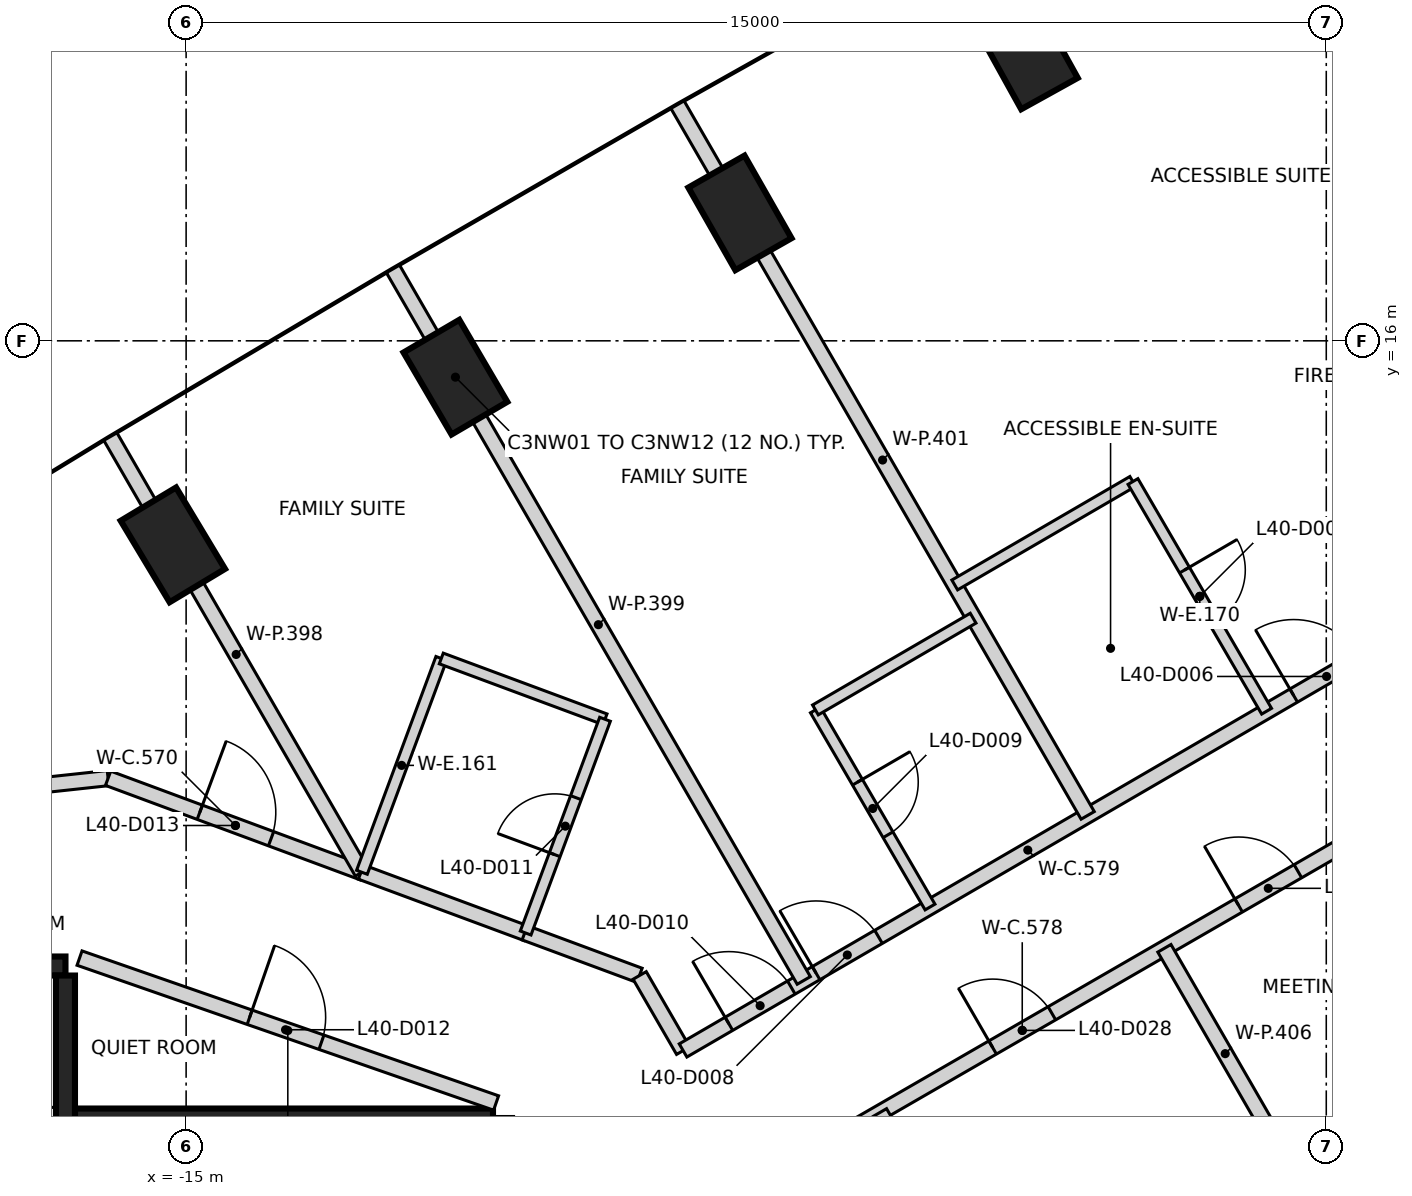
"""IFC4 building model, lengths in metres.
Left out: names, types, materials, properties, quantities, classifications, styles, units other than length and angle.
Written with IfcOpenShell. Run it as: python <this file> out.ifc"""

import sys

from ifc_helpers import new_model, si_unit, direction, frame, frame_2d, origin, origin_2d, place, context, subcontext, project, spatial, rectangle, extrude, element, fill, save


model = new_model("IFC4")
c1 = context("Model", 3, precision=1e-05, world=origin(), true_north=direction((0.0, 1.0)))
c2 = subcontext(c1, "Body", "Model", "MODEL_VIEW")
j1 = project(units=[si_unit("LENGTHUNIT", "METRE"), si_unit("PLANEANGLEUNIT", "RADIAN")], contexts=[c1])
p1 = place(None, origin())
s1 = spatial("IfcSite", under=j1, at=p1, CompositionType="ELEMENT")
p2 = place(p1, origin())
s2 = spatial("IfcBuilding", under=s1, at=p2, CompositionType="ELEMENT")
p3 = place(p2, frame((0.0, 0.0, 161.2)))
s3 = spatial("IfcBuildingStorey", under=s2, at=p3, CompositionType="ELEMENT", Elevation=161.2)
for number, where, z_axis, x_axis in (
    (1, (-3.945, 19.8, -0.4), (0.0, 0.0, 1.0), (-0.485, 0.875, 0.0)),
    (2, (-7.714, 17.683, -0.4), (0.0, 0.0, 1.0), (-0.495, 0.869, 0.0)),
    (3, (-11.457, 15.522, -0.4), (0.0, 0.0, 1.0), (-0.505, 0.863, 0.0)),
    (4, (-15.175, 13.316, -0.4), (0.0, 0.0, 1.0), (-0.515, 0.857, 0.0)),
):
    element("IfcColumn", number, at=place(p3, frame(where, z_axis=z_axis, x_axis=x_axis)), inside=s3, PredefinedType="COLUMN", context=c2, shape_type="SweptSolid", body=[
        extrude(rectangle(XDim=1.25, YDim=0.85, at=origin_2d()), origin(), (0.0, 0.0, 1.0), 2.884),
    ])
p4 = place(p3, frame((-16.472, 5.775, 0.0), z_axis=(0.0, 0.0, 1.0), x_axis=(1.0, 0.0, 0.0)))
e5 = element("IfcWall", 5, at=p4, inside=s3, PredefinedType="SHEAR", context=c2, shape_type="SweptSolid", body=[
    extrude(rectangle(XDim=5.51, YDim=0.25, at=frame_2d((2.755, 0.0))), origin(), (0.0, 0.0, 1.0), 3.2),
])
p5 = place(p3, frame((-19.637, 7.775, 0.0), z_axis=(0.0, 0.0, 1.0), x_axis=(1.0, 0.0, 0.0)))
e6 = element("IfcWall", 6, at=p5, inside=s3, PredefinedType="SHEAR", context=c2, shape_type="SweptSolid", body=[
    extrude(rectangle(XDim=3.05, YDim=0.25, at=frame_2d((1.525, 0.0))), origin(), (0.0, 0.0, 1.0), 3.2),
])
p6 = place(p3, frame((-16.587, 7.65, 0.0), z_axis=(0.0, 0.0, 1.0), x_axis=(0.0, -1.0, 0.0)))
e7 = element("IfcWall", 7, at=p6, inside=s3, PredefinedType="SHEAR", context=c2, shape_type="SweptSolid", body=[
    extrude(rectangle(XDim=2.865, YDim=0.25, at=frame_2d((1.432, 0.0))), origin(), (0.0, 0.0, 1.0), 3.2),
])
p7 = place(p3, frame((-18.865, 9.941, 0.0), z_axis=(0.0, 0.0, 1.0), x_axis=(0.99423123086, 0.107257911519, 0.0)))
e8 = element("IfcWall", 8, at=p7, inside=s3, PredefinedType="PARTITIONING", context=c2, shape_type="SweptSolid", body=[
    extrude(rectangle(XDim=2.854, YDim=0.2, at=frame_2d((1.427, 0.0))), origin(), (0.0, 0.0, 1.0), 3.2),
])
p8 = place(p3, frame((-16.402, 7.879, 0.0), z_axis=(0.0, 0.0, 1.0), x_axis=(0.944492255471, -0.328533680702, 0.0)))
e9 = element("IfcWall", 9, at=p8, inside=s3, PredefinedType="PARTITIONING", context=c2, shape_type="SweptSolid", body=[
    extrude(rectangle(XDim=5.802, YDim=0.2, at=frame_2d((2.901, 0.0))), origin(), (0.0, 0.0, 1.0), 3.2),
])
p9 = place(p8, frame((2.37, 0.0, 0.0)))
e10 = element("IfcOpeningElement", 10, at=p9, cuts=e9, PredefinedType="OPENING", context=c2, shape_type="SweptSolid", body=[
    extrude(rectangle(XDim=1.0, YDim=2.1, at=frame_2d((0.5, 1.05))), frame((0.0, 0.11, 0.0), z_axis=(0.0, -1.0, 0.0), x_axis=(1.0, 0.0, 0.0)), (0.0, 0.0, 1.0), 0.22),
])
p10 = place(p3, frame((-16.026, 10.245, 0.0), z_axis=(0.0, 0.0, 1.0), x_axis=(0.937597839511, -0.347721571584, 0.0)))
e11 = element("IfcWall", 11, at=p10, inside=s3, PredefinedType="PARTITIONING", context=c2, shape_type="SweptSolid", body=[
    extrude(rectangle(XDim=3.573, YDim=0.2, at=frame_2d((1.787, 0.0))), origin(), (0.0, 0.0, 1.0), 3.2),
])
p11 = place(p10, frame((1.287, 0.0, 0.0)))
e12 = element("IfcOpeningElement", 12, at=p11, cuts=e11, PredefinedType="OPENING", context=c2, shape_type="SweptSolid", body=[
    extrude(rectangle(XDim=1.0, YDim=2.1, at=frame_2d((0.5, 1.05))), frame((0.0, 0.11, 0.0), z_axis=(0.0, -1.0, 0.0), x_axis=(1.0, 0.0, 0.0)), (0.0, 0.0, 1.0), 0.22),
])
p12 = place(p3, frame((-12.699, 9.011, 0.0), z_axis=(0.0, 0.0, 1.0), x_axis=(0.937666284737, -0.347536959858, 0.0)))
e13 = element("IfcWall", 13, at=p12, inside=s3, PredefinedType="PARTITIONING", context=c2, shape_type="SweptSolid", body=[
    extrude(rectangle(XDim=2.322, YDim=0.2, at=frame_2d((1.161, 0.0))), origin(), (0.0, 0.0, 1.0), 3.2),
])
p13 = place(p3, frame((-10.545, 8.212, 0.0), z_axis=(0.0, 0.0, 1.0), x_axis=(0.937637162141, -0.347615523491, 0.0)))
e14 = element("IfcWall", 14, at=p13, inside=s3, PredefinedType="PARTITIONING", context=c2, shape_type="SweptSolid", body=[
    extrude(rectangle(XDim=1.61, YDim=0.2, at=frame_2d((0.805, 0.0))), origin(), (0.0, 0.0, 1.0), 3.2),
])
p14 = place(p3, frame((-9.033, 7.651, 0.0), z_axis=(0.0, 0.0, 1.0), x_axis=(0.500758224517, -0.86558719987, 0.0)))
e15 = element("IfcWall", 15, at=p14, inside=s3, PredefinedType="PARTITIONING", context=c2, shape_type="SweptSolid", body=[
    extrude(rectangle(XDim=1.142, YDim=0.2, at=frame_2d((0.571, 0.0))), origin(), (0.0, 0.0, 1.0), 3.2),
])
p15 = place(p3, frame((-8.612, 4.265, 0.0), z_axis=(0.0, 0.0, 1.0), x_axis=(0.865984415152, 0.500070987675, 0.0)))
e16 = element("IfcWall", 16, at=p15, inside=s3, PredefinedType="PARTITIONING", context=c2, shape_type="SweptSolid", body=[
    extrude(rectangle(XDim=10.651, YDim=0.2, at=frame_2d((5.326, 0.0))), origin(), (0.0, 0.0, 1.0), 3.2),
])
p16 = place(p15, frame((8.613, 0.0, 0.0)))
e17 = element("IfcOpeningElement", 17, at=p16, cuts=e16, PredefinedType="OPENING", context=c2, shape_type="SweptSolid", body=[
    extrude(rectangle(XDim=0.9, YDim=2.1, at=frame_2d((0.45, 1.05))), frame((0.0, 0.11, 0.0), z_axis=(0.0, -1.0, 0.0), x_axis=(1.0, 0.0, 0.0)), (0.0, 0.0, 1.0), 0.22),
])
p17 = place(p15, frame((4.876, 0.0, 0.0)))
e18 = element("IfcOpeningElement", 18, at=p17, cuts=e16, PredefinedType="OPENING", context=c2, shape_type="SweptSolid", body=[
    extrude(rectangle(XDim=0.9, YDim=2.1, at=frame_2d((0.45, 1.05))), frame((0.0, 0.11, 0.0), z_axis=(0.0, -1.0, 0.0), x_axis=(1.0, 0.0, 0.0)), (0.0, 0.0, 1.0), 0.22),
])
p18 = place(p15, frame((1.138, 0.0, 0.0)))
e19 = element("IfcOpeningElement", 19, at=p18, cuts=e16, PredefinedType="OPENING", context=c2, shape_type="SweptSolid", body=[
    extrude(rectangle(XDim=0.9, YDim=2.1, at=frame_2d((0.45, 1.05))), frame((0.0, 0.11, 0.0), z_axis=(0.0, -1.0, 0.0), x_axis=(1.0, 0.0, 0.0)), (0.0, 0.0, 1.0), 0.22),
])
p19 = place(p3, frame((-8.462, 6.664, 0.0), z_axis=(0.0, 0.0, 1.0), x_axis=(0.864575369233, 0.502503165081, 0.0)))
e20 = element("IfcWall", 20, at=p19, inside=s3, PredefinedType="PARTITIONING", context=c2, shape_type="SweptSolid", body=[
    extrude(rectangle(XDim=10.492, YDim=0.2, at=frame_2d((5.246, 0.0))), origin(), (0.0, 0.0, 1.0), 3.2),
])
p20 = place(p19, frame((9.292, 0.0, 0.0)))
e21 = element("IfcOpeningElement", 21, at=p20, cuts=e20, PredefinedType="OPENING", context=c2, shape_type="SweptSolid", body=[
    extrude(rectangle(XDim=1.0, YDim=2.1, at=frame_2d((0.5, 1.05))), frame((0.0, 0.11, 0.0), z_axis=(0.0, -1.0, 0.0), x_axis=(1.0, 0.0, 0.0)), (0.0, 0.0, 1.0), 0.22),
])
p21 = place(p19, frame((2.024, 0.0, 0.0)))
e22 = element("IfcOpeningElement", 22, at=p21, cuts=e20, PredefinedType="OPENING", context=c2, shape_type="SweptSolid", body=[
    extrude(rectangle(XDim=0.95, YDim=2.1, at=frame_2d((0.475, 1.05))), frame((0.0, 0.11, 0.0), z_axis=(0.0, -1.0, 0.0), x_axis=(1.0, 0.0, 0.0)), (0.0, 0.0, 1.0), 0.22),
])
p22 = place(p19, frame((0.698, 0.0, 0.0)))
e23 = element("IfcOpeningElement", 23, at=p22, cuts=e20, PredefinedType="OPENING", context=c2, shape_type="SweptSolid", body=[
    extrude(rectangle(XDim=0.95, YDim=2.1, at=frame_2d((0.475, 1.05))), frame((0.0, 0.11, 0.0), z_axis=(0.0, -1.0, 0.0), x_axis=(1.0, 0.0, 0.0)), (0.0, 0.0, 1.0), 0.22),
])
p23 = place(p3, frame((-15.996, 14.74, 0.0), z_axis=(0.0, 0.0, 1.0), x_axis=(0.500015153377, -0.866016654801, 0.0)))
e24 = element("IfcWall", 24, at=p23, inside=s3, PredefinedType="PARTITIONING", context=c2, shape_type="SweptSolid", body=[
    extrude(rectangle(XDim=6.618, YDim=0.2, at=frame_2d((3.309, 0.0))), origin(), (0.0, 0.0, 1.0), 3.2),
])
p24 = place(p3, frame((-12.279, 16.946, 0.0), z_axis=(0.0, 0.0, 1.0), x_axis=(0.500003997498, -0.866023095816, 0.0)))
e25 = element("IfcWall", 25, at=p24, inside=s3, PredefinedType="PARTITIONING", context=c2, shape_type="SweptSolid", body=[
    extrude(rectangle(XDim=10.809, YDim=0.2, at=frame_2d((5.405, 0.0))), origin(), (0.0, 0.0, 1.0), 3.2),
])
p25 = place(p3, frame((-8.535, 19.107, 0.0), z_axis=(0.0, 0.0, 1.0), x_axis=(0.499882324153, -0.866093333307, 0.0)))
e26 = element("IfcWall", 26, at=p25, inside=s3, PredefinedType="PARTITIONING", context=c2, shape_type="SweptSolid", body=[
    extrude(rectangle(XDim=10.796, YDim=0.2, at=frame_2d((5.398, 0.0))), origin(), (0.0, 0.0, 1.0), 3.2),
])
p26 = place(p3, frame((-8.0, 0.924, 0.0), z_axis=(0.0, 0.0, 1.0), x_axis=(0.86604129137, 0.499972480886, 0.0)))
e27 = element("IfcWall", 27, at=p26, inside=s3, PredefinedType="PARTITIONING", context=c2, shape_type="SweptSolid", body=[
    extrude(rectangle(XDim=12.932, YDim=0.2, at=frame_2d((6.466, 0.0))), origin(), (0.0, 0.0, 1.0), 2.3),
])
for number, where, z_axis, x_axis in (
    (28, (-5.871, 5.848, 0.0), (0.0, 0.0, 1.0), (0.5, -0.866, 0.0)),
    (29, (-2.13, 8.008, 0.0), (0.0, 0.0, 1.0), (0.5, -0.866, 0.0)),
):
    element("IfcWall", number, at=place(p3, frame(where, z_axis=z_axis, x_axis=x_axis)), inside=s3, PredefinedType="PARTITIONING", context=c2, shape_type="SweptSolid", body=[
        extrude(rectangle(XDim=3.2, YDim=0.2, at=frame_2d((1.6, 0.0))), origin(), (0.0, 0.0, 1.0), 2.3),
    ])
p27 = place(p3, frame((-12.687, 9.008, 0.0), z_axis=(0.0, 0.0, 1.0), x_axis=(0.347929104424, 0.937520846859, 0.0)))
e30 = element("IfcWall", 30, at=p27, inside=s3, PredefinedType="PARTITIONING", context=c2, shape_type="SweptSolid", body=[
    extrude(rectangle(XDim=3.0, YDim=0.15, at=frame_2d((1.5, 0.0))), origin(), (0.0, 0.0, 1.0), 3.2),
])
p28 = place(p3, frame((-11.643, 11.821, 0.0), z_axis=(0.0, 0.0, 1.0), x_axis=(0.937429235302, -0.348175859015, 0.0)))
e31 = element("IfcWall", 31, at=p28, inside=s3, PredefinedType="PARTITIONING", context=c2, shape_type="SweptSolid", body=[
    extrude(rectangle(XDim=2.298, YDim=0.15, at=frame_2d((1.149, 0.0))), origin(), (0.0, 0.0, 1.0), 3.2),
])
p29 = place(p3, frame((-10.533, 8.209, 0.0), z_axis=(0.0, 0.0, 1.0), x_axis=(0.348035300423, 0.937481428968, 0.0)))
e32 = element("IfcWall", 32, at=p29, inside=s3, PredefinedType="PARTITIONING", context=c2, shape_type="SweptSolid", body=[
    extrude(rectangle(XDim=3.0, YDim=0.15, at=frame_2d((1.5, 0.0))), origin(), (0.0, 0.0, 1.0), 3.2),
])
p30 = place(p29, frame((1.1, 0.0, 0.0)))
e33 = element("IfcOpeningElement", 33, at=p30, cuts=e32, PredefinedType="OPENING", context=c2, shape_type="SweptSolid", body=[
    extrude(rectangle(XDim=0.8, YDim=2.1, at=frame_2d((0.4, 1.05))), frame((0.0, 0.085, 0.0), z_axis=(0.0, -1.0, 0.0), x_axis=(1.0, 0.0, 0.0)), (0.0, 0.0, 1.0), 0.17),
])
p31 = place(p3, frame((-6.721, 11.144, 0.0), z_axis=(0.0, 0.0, 1.0), x_axis=(0.502742108773, -0.864436447673, 0.0)))
e34 = element("IfcWall", 34, at=p31, inside=s3, PredefinedType="PARTITIONING", context=c2, shape_type="SweptSolid", body=[
    extrude(rectangle(XDim=3.0, YDim=0.15, at=frame_2d((1.5, 0.0))), origin(), (0.0, 0.0, 1.0), 3.2),
])
p32 = place(p31, frame((1.1, 0.0, 0.0)))
e35 = element("IfcOpeningElement", 35, at=p32, cuts=e34, PredefinedType="OPENING", context=c2, shape_type="SweptSolid", body=[
    extrude(rectangle(XDim=0.8, YDim=2.1, at=frame_2d((0.4, 1.05))), frame((0.0, 0.085, 0.0), z_axis=(0.0, -1.0, 0.0), x_axis=(1.0, 0.0, 0.0)), (0.0, 0.0, 1.0), 0.17),
])
p33 = place(p3, frame((-6.721, 11.144, 0.0), z_axis=(0.0, 0.0, 1.0), x_axis=(0.864386917082, 0.502827264155, 0.0)))
e36 = element("IfcWall", 36, at=p33, inside=s3, PredefinedType="PARTITIONING", context=c2, shape_type="SweptSolid", body=[
    extrude(rectangle(XDim=2.4, YDim=0.15, at=frame_2d((1.2, 0.0))), origin(), (0.0, 0.0, 1.0), 3.2),
])
p34 = place(p3, frame((-4.888, 12.788, 0.0), z_axis=(0.0, 0.0, 1.0), x_axis=(0.864480777266, 0.502665878827, 0.0)))
e37 = element("IfcWall", 37, at=p34, inside=s3, PredefinedType="PARTITIONING", context=c2, shape_type="SweptSolid", body=[
    extrude(rectangle(XDim=2.709, YDim=0.15, at=frame_2d((1.354, 0.0))), origin(), (0.0, 0.0, 1.0), 3.2),
])
p35 = place(p3, frame((-2.543, 14.149, 0.0), z_axis=(0.0, 0.0, 1.0), x_axis=(0.502854686853, -0.864370964292, 0.0)))
e38 = element("IfcWall", 38, at=p35, inside=s3, PredefinedType="PARTITIONING", context=c2, shape_type="SweptSolid", body=[
    extrude(rectangle(XDim=3.496, YDim=0.15, at=frame_2d((1.748, 0.0))), origin(), (0.0, 0.0, 1.0), 3.2),
])
p36 = place(p35, frame((1.348, 0.0, 0.0)))
e39 = element("IfcOpeningElement", 39, at=p36, cuts=e38, PredefinedType="OPENING", context=c2, shape_type="SweptSolid", body=[
    extrude(rectangle(XDim=0.8, YDim=2.1, at=frame_2d((0.4, 1.05))), frame((0.0, 0.085, 0.0), z_axis=(0.0, -1.0, 0.0), x_axis=(1.0, 0.0, 0.0)), (0.0, 0.0, 1.0), 0.17),
])
p37 = place(p20, origin())
e40 = element("IfcDoor", 40, at=p37, inside=s3, OperationType="SINGLE_SWING_LEFT", PredefinedType="DOOR", context=c2, shape_type="SweptSolid", body=[
    extrude(rectangle(XDim=1.0, YDim=2.1, at=frame_2d((0.5, 1.05))), frame((0.0, 0.025, 0.0), z_axis=(0.0, -1.0, 0.0), x_axis=(1.0, 0.0, 0.0)), (0.0, 0.0, 1.0), 0.05),
])
fill(e21, e40)
p38 = place(p36, origin())
e41 = element("IfcDoor", 41, at=p38, inside=s3, OperationType="SINGLE_SWING_LEFT", PredefinedType="DOOR", context=c2, shape_type="SweptSolid", body=[
    extrude(rectangle(XDim=0.8, YDim=2.1, at=frame_2d((0.4, 1.05))), frame((0.0, 0.025, 0.0), z_axis=(0.0, -1.0, 0.0), x_axis=(1.0, 0.0, 0.0)), (0.0, 0.0, 1.0), 0.05),
])
fill(e39, e41)
p39 = place(p21, origin())
e42 = element("IfcDoor", 42, at=p39, inside=s3, OperationType="SINGLE_SWING_LEFT", PredefinedType="DOOR", context=c2, shape_type="SweptSolid", body=[
    extrude(rectangle(XDim=0.95, YDim=2.1, at=frame_2d((0.475, 1.05))), frame((0.0, 0.025, 0.0), z_axis=(0.0, -1.0, 0.0), x_axis=(1.0, 0.0, 0.0)), (0.0, 0.0, 1.0), 0.05),
])
fill(e22, e42)
p40 = place(p32, origin())
e43 = element("IfcDoor", 43, at=p40, inside=s3, OperationType="SINGLE_SWING_LEFT", PredefinedType="DOOR", context=c2, shape_type="SweptSolid", body=[
    extrude(rectangle(XDim=0.8, YDim=2.1, at=frame_2d((0.4, 1.05))), frame((0.0, 0.025, 0.0), z_axis=(0.0, -1.0, 0.0), x_axis=(1.0, 0.0, 0.0)), (0.0, 0.0, 1.0), 0.05),
])
fill(e35, e43)
p41 = place(p22, origin())
e44 = element("IfcDoor", 44, at=p41, inside=s3, OperationType="SINGLE_SWING_LEFT", PredefinedType="DOOR", context=c2, shape_type="SweptSolid", body=[
    extrude(rectangle(XDim=0.95, YDim=2.1, at=frame_2d((0.475, 1.05))), frame((0.0, 0.025, 0.0), z_axis=(0.0, -1.0, 0.0), x_axis=(1.0, 0.0, 0.0)), (0.0, 0.0, 1.0), 0.05),
])
fill(e23, e44)
p42 = place(p30, origin())
e45 = element("IfcDoor", 45, at=p42, inside=s3, OperationType="SINGLE_SWING_LEFT", PredefinedType="DOOR", context=c2, shape_type="SweptSolid", body=[
    extrude(rectangle(XDim=0.8, YDim=2.1, at=frame_2d((0.4, 1.05))), frame((0.0, 0.025, 0.0), z_axis=(0.0, -1.0, 0.0), x_axis=(1.0, 0.0, 0.0)), (0.0, 0.0, 1.0), 0.05),
])
fill(e33, e45)
p43 = place(p9, frame((1.0, 0.0, 0.0), z_axis=(0.0, 0.0, 1.0), x_axis=(-1.0, 0.0, 0.0)))
e46 = element("IfcDoor", 46, at=p43, inside=s3, OperationType="SINGLE_SWING_LEFT", PredefinedType="DOOR", context=c2, shape_type="SweptSolid", body=[
    extrude(rectangle(XDim=1.0, YDim=2.1, at=frame_2d((0.5, 1.05))), frame((0.0, 0.025, 0.0), z_axis=(0.0, -1.0, 0.0), x_axis=(1.0, 0.0, 0.0)), (0.0, 0.0, 1.0), 0.05),
])
fill(e10, e46)
p44 = place(p11, frame((1.0, 0.0, 0.0), z_axis=(0.0, 0.0, 1.0), x_axis=(-1.0, 0.0, 0.0)))
e47 = element("IfcDoor", 47, at=p44, inside=s3, OperationType="SINGLE_SWING_LEFT", PredefinedType="DOOR", context=c2, shape_type="SweptSolid", body=[
    extrude(rectangle(XDim=1.0, YDim=2.1, at=frame_2d((0.5, 1.05))), frame((0.0, 0.025, 0.0), z_axis=(0.0, -1.0, 0.0), x_axis=(1.0, 0.0, 0.0)), (0.0, 0.0, 1.0), 0.05),
])
fill(e12, e47)
p45 = place(p16, frame((0.9, 0.0, 0.0), z_axis=(0.0, 0.0, 1.0), x_axis=(-1.0, 0.0, 0.0)))
e48 = element("IfcDoor", 48, at=p45, inside=s3, OperationType="SINGLE_SWING_LEFT", PredefinedType="DOOR", context=c2, shape_type="SweptSolid", body=[
    extrude(rectangle(XDim=0.9, YDim=2.1, at=frame_2d((0.45, 1.05))), frame((0.0, 0.025, 0.0), z_axis=(0.0, -1.0, 0.0), x_axis=(1.0, 0.0, 0.0)), (0.0, 0.0, 1.0), 0.05),
])
fill(e17, e48)
p46 = place(p17, frame((0.9, 0.0, 0.0), z_axis=(0.0, 0.0, 1.0), x_axis=(-1.0, 0.0, 0.0)))
e49 = element("IfcDoor", 49, at=p46, inside=s3, OperationType="SINGLE_SWING_LEFT", PredefinedType="DOOR", context=c2, shape_type="SweptSolid", body=[
    extrude(rectangle(XDim=0.9, YDim=2.1, at=frame_2d((0.45, 1.05))), frame((0.0, 0.025, 0.0), z_axis=(0.0, -1.0, 0.0), x_axis=(1.0, 0.0, 0.0)), (0.0, 0.0, 1.0), 0.05),
])
fill(e18, e49)
save(model, sys.argv[1])
